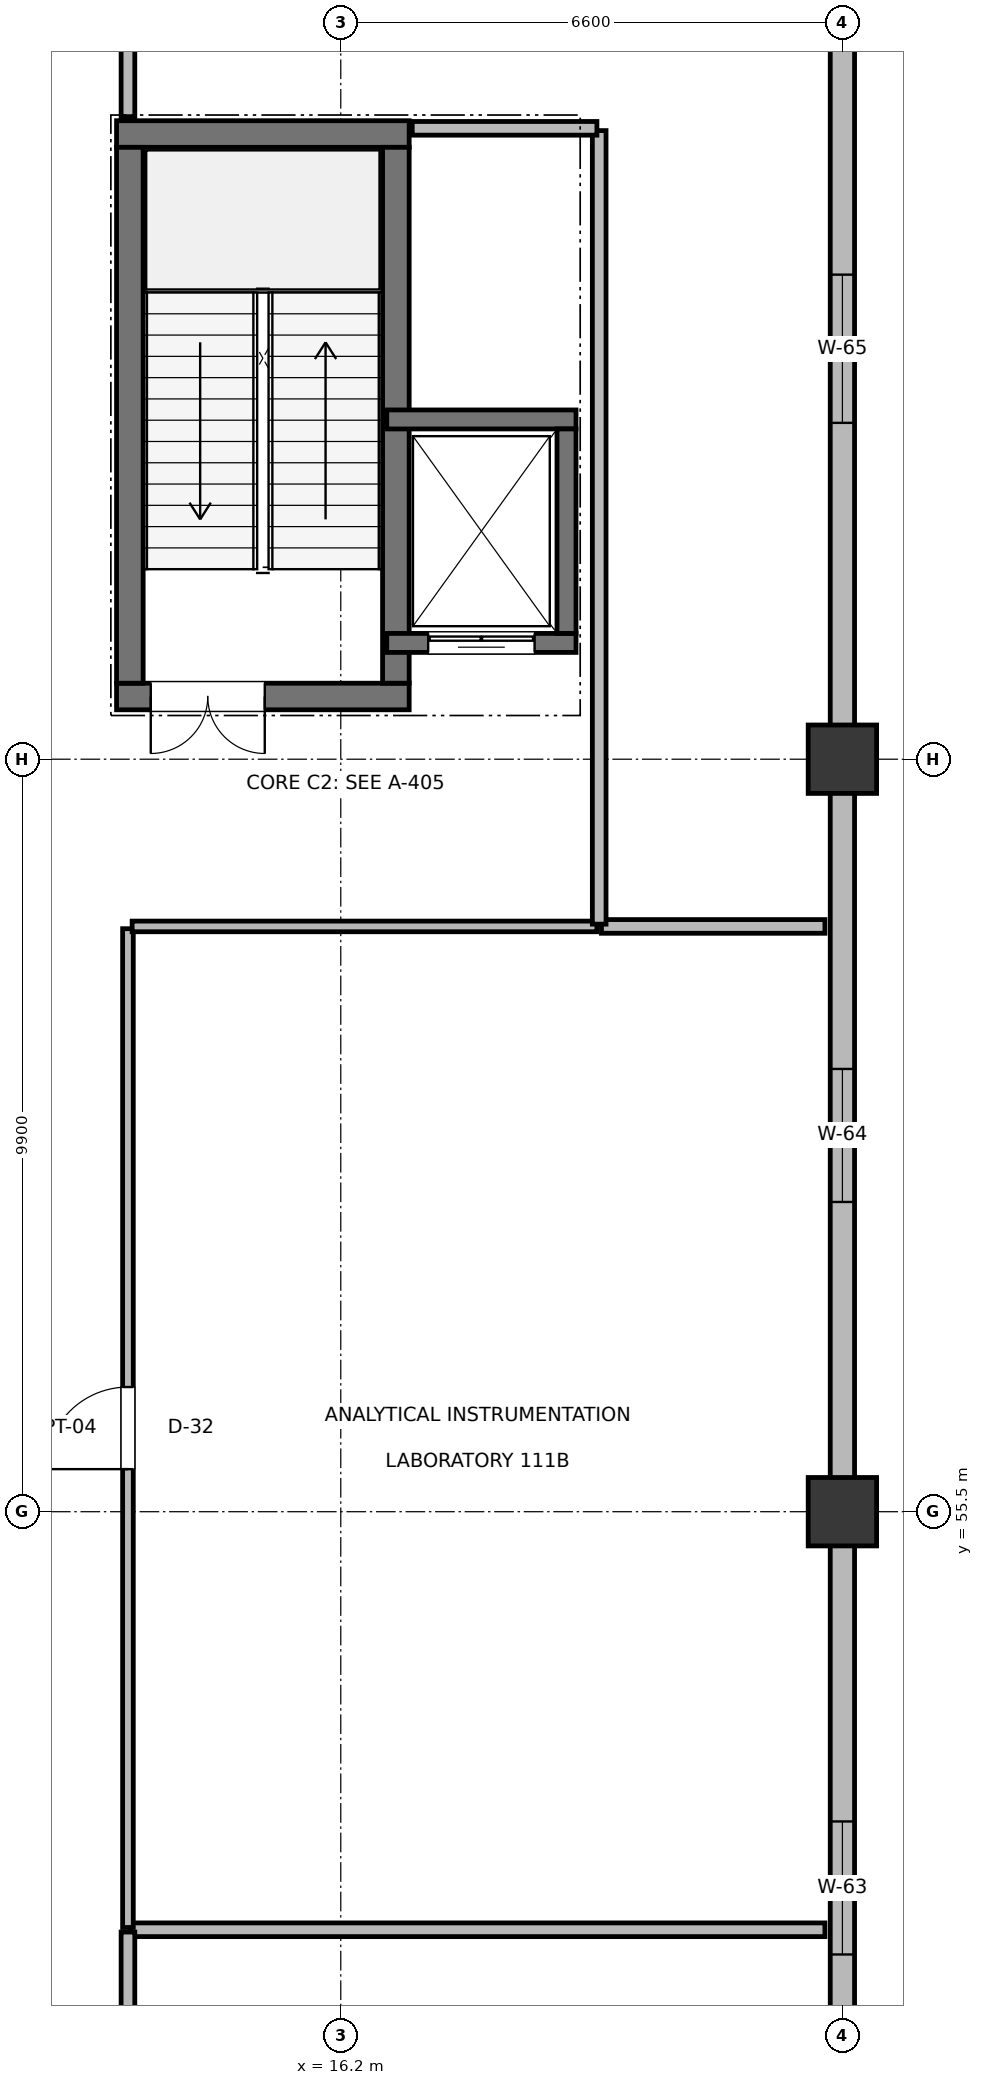
"""IFC4 building model, lengths in metres.
Left out: names, types, materials, properties, quantities, classifications, styles, units other than length and angle.
Written with IfcOpenShell. Run it as: python <this file> out.ifc"""

import sys

from ifc_helpers import new_model, si_unit, direction, frame, frame_2d, origin, origin_2d, place, context, subcontext, project, spatial, rectangle, extrude, element, fill, save


model = new_model("IFC4")
c1 = context("Model", 3, precision=1e-05, world=origin(), true_north=direction((0.0, 1.0)))
c2 = subcontext(c1, "Body", "Model", "MODEL_VIEW")
j1 = project(units=[si_unit("LENGTHUNIT", "METRE"), si_unit("PLANEANGLEUNIT", "RADIAN")], contexts=[c1])
p1 = place(None, origin())
s1 = spatial("IfcSite", under=j1, at=p1, CompositionType="ELEMENT")
p2 = place(p1, origin())
s2 = spatial("IfcBuilding", under=s1, at=p2, CompositionType="ELEMENT")
p3 = place(p2, frame((0.0, 0.0, 5.4)))
s3 = spatial("IfcBuildingStorey", under=s2, at=p3, CompositionType="ELEMENT", Elevation=5.4)
for number, where, z_axis, x_axis in (
    (1, (22.8, 55.5, 0.0), (0.0, 0.0, 1.0), (1.0, 0.0, 0.0)),
    (2, (22.8, 65.4, 0.0), (0.0, 0.0, 1.0), (1.0, 0.0, 0.0)),
):
    element("IfcColumn", number, at=place(p3, frame(where, z_axis=z_axis, x_axis=x_axis)), inside=s3, PredefinedType="COLUMN", context=c2, shape_type="SweptSolid", body=[
        extrude(rectangle(XDim=0.9, YDim=0.9, at=origin_2d()), origin(), (0.0, 0.0, 1.0), 4.8),
    ])
p4 = place(p3, frame((22.8, 46.035, 0.0), z_axis=(0.0, 0.0, 1.0), x_axis=(0.0, 1.0, 0.0)))
e3 = element("IfcWall", 3, at=p4, inside=s3, PredefinedType="SOLIDWALL", context=c2, shape_type="SweptSolid", body=[
    extrude(rectangle(XDim=9.03, YDim=0.32, at=frame_2d((4.515, 0.0))), origin(), (0.0, 0.0, 1.0), 3.625),
])
p5 = place(p4, frame((3.64, 0.0, 0.9)))
e4 = element("IfcOpeningElement", 4, at=p5, cuts=e3, PredefinedType="OPENING", context=c2, shape_type="SweptSolid", body=[
    extrude(rectangle(XDim=1.75, YDim=1.55, at=frame_2d((0.875, 0.775))), frame((0.0, 0.17, 0.0), z_axis=(0.0, -1.0, 0.0), x_axis=(1.0, 0.0, 0.0)), (0.0, 0.0, 1.0), 0.34),
])
p6 = place(p3, frame((22.8, 55.935, 0.0), z_axis=(0.0, 0.0, 1.0), x_axis=(0.0, 1.0, 0.0)))
e5 = element("IfcWall", 5, at=p6, inside=s3, PredefinedType="SOLIDWALL", context=c2, shape_type="SweptSolid", body=[
    extrude(rectangle(XDim=9.03, YDim=0.32, at=frame_2d((4.515, 0.0))), origin(), (0.0, 0.0, 1.0), 3.625),
])
p7 = place(p6, frame((3.64, 0.0, 0.9)))
e6 = element("IfcOpeningElement", 6, at=p7, cuts=e5, PredefinedType="OPENING", context=c2, shape_type="SweptSolid", body=[
    extrude(rectangle(XDim=1.75, YDim=1.75, at=frame_2d((0.875, 0.875))), frame((0.0, 0.17, 0.0), z_axis=(0.0, -1.0, 0.0), x_axis=(1.0, 0.0, 0.0)), (0.0, 0.0, 1.0), 0.34),
])
p8 = place(p3, frame((22.8, 65.835, 0.0), z_axis=(0.0, 0.0, 1.0), x_axis=(0.0, 1.0, 0.0)))
e7 = element("IfcWall", 7, at=p8, inside=s3, PredefinedType="SOLIDWALL", context=c2, shape_type="SweptSolid", body=[
    extrude(rectangle(XDim=9.93, YDim=0.32, at=frame_2d((4.965, 0.0))), origin(), (0.0, 0.0, 1.0), 3.625),
])
p9 = place(p8, frame((3.99, 0.0, 0.9)))
e8 = element("IfcOpeningElement", 8, at=p9, cuts=e7, PredefinedType="OPENING", context=c2, shape_type="SweptSolid", body=[
    extrude(rectangle(XDim=1.95, YDim=1.15, at=frame_2d((0.975, 0.575))), frame((0.0, 0.17, 0.0), z_axis=(0.0, -1.0, 0.0), x_axis=(1.0, 0.0, 0.0)), (0.0, 0.0, 1.0), 0.34),
])
p10 = place(p3, frame((13.25, 66.225, 0.0), z_axis=(0.0, 0.0, 1.0), x_axis=(1.0, 0.0, 0.0)))
e9 = element("IfcWall", 9, at=p10, inside=s3, PredefinedType="SHEAR", context=c2, shape_type="SweptSolid", body=[
    extrude(rectangle(XDim=3.85, YDim=0.35, at=frame_2d((1.925, 0.0))), origin(), (0.0, 0.0, 1.0), 4.58),
])
p11 = place(p10, frame((0.45, 0.0, 0.0)))
e10 = element("IfcOpeningElement", 10, at=p11, cuts=e9, PredefinedType="OPENING", context=c2, shape_type="SweptSolid", body=[
    extrude(rectangle(XDim=1.5, YDim=2.2, at=frame_2d((0.75, 1.1))), frame((0.0, 0.185, 0.0), z_axis=(0.0, -1.0, 0.0), x_axis=(1.0, 0.0, 0.0)), (0.0, 0.0, 1.0), 0.37),
])
p12 = place(p3, frame((13.25, 73.625, 0.0), z_axis=(0.0, 0.0, 1.0), x_axis=(1.0, 0.0, 0.0)))
e11 = element("IfcWall", 11, at=p12, inside=s3, PredefinedType="SHEAR", context=c2, shape_type="SweptSolid", body=[
    extrude(rectangle(XDim=3.85, YDim=0.35, at=frame_2d((1.925, 0.0))), origin(), (0.0, 0.0, 1.0), 4.58),
])
for number, where, z_axis, x_axis in (
    (12, (13.425, 66.4, 0.0), (0.0, 0.0, 1.0), (0.0, 1.0, 0.0)),
    (13, (16.925, 66.4, 0.0), (0.0, 0.0, 1.0), (0.0, 1.0, 0.0)),
):
    element("IfcWall", number, at=place(p3, frame(where, z_axis=z_axis, x_axis=x_axis)), inside=s3, PredefinedType="SHEAR", context=c2, shape_type="SweptSolid", body=[
        extrude(rectangle(XDim=7.05, YDim=0.35, at=frame_2d((3.525, 0.0))), origin(), (0.0, 0.0, 1.0), 4.58),
    ])
p13 = place(p3, frame((16.805, 66.93, 0.0), z_axis=(0.0, 0.0, 1.0), x_axis=(1.0, 0.0, 0.0)))
e14 = element("IfcWall", 14, at=p13, inside=s3, PredefinedType="SHEAR", context=c2, shape_type="SweptSolid", body=[
    extrude(rectangle(XDim=2.49, YDim=0.25, at=frame_2d((1.245, 0.0))), origin(), (0.0, 0.0, 1.0), 4.56),
])
p14 = place(p13, frame((0.545, 0.0, 0.0)))
e15 = element("IfcOpeningElement", 15, at=p14, cuts=e14, PredefinedType="OPENING", context=c2, shape_type="SweptSolid", body=[
    extrude(rectangle(XDim=1.4, YDim=2.3, at=frame_2d((0.7, 1.15))), frame((0.0, 0.135, 0.0), z_axis=(0.0, -1.0, 0.0), x_axis=(1.0, 0.0, 0.0)), (0.0, 0.0, 1.0), 0.27),
])
p15 = place(p3, frame((16.805, 69.87, 0.0), z_axis=(0.0, 0.0, 1.0), x_axis=(1.0, 0.0, 0.0)))
e16 = element("IfcWall", 16, at=p15, inside=s3, PredefinedType="SHEAR", context=c2, shape_type="SweptSolid", body=[
    extrude(rectangle(XDim=2.49, YDim=0.25, at=frame_2d((1.245, 0.0))), origin(), (0.0, 0.0, 1.0), 4.56),
])
p16 = place(p3, frame((19.17, 67.055, 0.0), z_axis=(0.0, 0.0, 1.0), x_axis=(0.0, 1.0, 0.0)))
e17 = element("IfcWall", 17, at=p16, inside=s3, PredefinedType="SHEAR", context=c2, shape_type="SweptSolid", body=[
    extrude(rectangle(XDim=2.69, YDim=0.25, at=frame_2d((1.345, 0.0))), origin(), (0.0, 0.0, 1.0), 4.56),
])
p17 = place(p3, frame((13.43, 50.0, 0.0), z_axis=(0.0, 0.0, 1.0), x_axis=(1.0, 0.0, 0.0)))
e18 = element("IfcWall", 18, at=p17, inside=s3, PredefinedType="PARTITIONING", context=c2, shape_type="SweptSolid", body=[
    extrude(rectangle(XDim=9.14, YDim=0.18, at=frame_2d((4.57, 0.0))), origin(), (0.0, 0.0, 1.0), 3.625),
])
p18 = place(p3, frame((13.4, 30.03, 0.0), z_axis=(0.0, 0.0, 1.0), x_axis=(0.0, 1.0, 0.0)))
e19 = element("IfcWall", 19, at=p18, inside=s3, PredefinedType="PARTITIONING", context=c2, shape_type="SweptSolid", body=[
    extrude(rectangle(XDim=19.94, YDim=0.18, at=frame_2d((9.97, 0.0))), origin(), (0.0, 0.0, 1.0), 3.555),
])
p19 = place(p18, frame((9.445, 0.0, 0.0)))
e20 = element("IfcOpeningElement", 20, at=p19, cuts=e19, PredefinedType="OPENING", context=c2, shape_type="SweptSolid", body=[
    extrude(rectangle(XDim=1.05, YDim=2.2, at=frame_2d((0.525, 1.1))), frame((0.0, 0.1, 0.0), z_axis=(0.0, -1.0, 0.0), x_axis=(1.0, 0.0, 0.0)), (0.0, 0.0, 1.0), 0.2),
])
p20 = place(p3, frame((19.63, 63.2, 0.0), z_axis=(0.0, 0.0, 1.0), x_axis=(1.0, 0.0, 0.0)))
e21 = element("IfcWall", 21, at=p20, inside=s3, PredefinedType="PARTITIONING", context=c2, shape_type="SweptSolid", body=[
    extrude(rectangle(XDim=2.94, YDim=0.18, at=frame_2d((1.47, 0.0))), origin(), (0.0, 0.0, 1.0), 3.625),
])
p21 = place(p3, frame((13.4, 50.03, 0.0), z_axis=(0.0, 0.0, 1.0), x_axis=(0.0, 1.0, 0.0)))
e22 = element("IfcWall", 22, at=p21, inside=s3, PredefinedType="PARTITIONING", context=c2, shape_type="SweptSolid", body=[
    extrude(rectangle(XDim=13.14, YDim=0.14, at=frame_2d((6.57, 0.0))), origin(), (0.0, 0.0, 1.0), 3.675),
])
p22 = place(p21, frame((6.03, 0.0, 0.0)))
e23 = element("IfcOpeningElement", 23, at=p22, cuts=e22, PredefinedType="OPENING", context=c2, shape_type="SweptSolid", body=[
    extrude(rectangle(XDim=1.08, YDim=2.15, at=frame_2d((0.54, 1.075))), frame((0.0, 0.08, 0.0), z_axis=(0.0, -1.0, 0.0), x_axis=(1.0, 0.0, 0.0)), (0.0, 0.0, 1.0), 0.16),
])
p23 = place(p3, frame((13.455, 63.2, 0.0), z_axis=(0.0, 0.0, 1.0), x_axis=(1.0, 0.0, 0.0)))
e24 = element("IfcWall", 24, at=p23, inside=s3, PredefinedType="PARTITIONING", context=c2, shape_type="SweptSolid", body=[
    extrude(rectangle(XDim=6.115, YDim=0.14, at=frame_2d((3.058, 0.0))), origin(), (0.0, 0.0, 1.0), 3.875),
])
p24 = place(p3, frame((13.4, 73.853, 0.0), z_axis=(0.0, 0.0, 1.0), x_axis=(0.0, 1.0, 0.0)))
e25 = element("IfcWall", 25, at=p24, inside=s3, PredefinedType="PARTITIONING", context=c2, shape_type="SweptSolid", body=[
    extrude(rectangle(XDim=11.117, YDim=0.18, at=frame_2d((5.558, 0.0))), origin(), (0.0, 0.0, 1.0), 3.675),
])
p25 = place(p24, frame((4.858, 0.0, 0.0)))
e26 = element("IfcOpeningElement", 26, at=p25, cuts=e25, PredefinedType="OPENING", context=c2, shape_type="SweptSolid", body=[
    extrude(rectangle(XDim=1.4, YDim=2.2, at=frame_2d((0.7, 1.1))), frame((0.0, 0.1, 0.0), z_axis=(0.0, -1.0, 0.0), x_axis=(1.0, 0.0, 0.0)), (0.0, 0.0, 1.0), 0.2),
])
p26 = place(p3, frame((19.6, 63.23, 0.0), z_axis=(0.0, 0.0, 1.0), x_axis=(0.0, 1.0, 0.0)))
e27 = element("IfcWall", 27, at=p26, inside=s3, PredefinedType="PARTITIONING", context=c2, shape_type="SweptSolid", body=[
    extrude(rectangle(XDim=10.44, YDim=0.18, at=frame_2d((5.22, 0.0))), origin(), (0.0, 0.0, 1.0), 3.655),
])
p27 = place(p3, frame((17.14, 73.7, 0.0), z_axis=(0.0, 0.0, 1.0), x_axis=(1.0, 0.0, 0.0)))
e28 = element("IfcWall", 28, at=p27, inside=s3, PredefinedType="PARTITIONING", context=c2, shape_type="SweptSolid", body=[
    extrude(rectangle(XDim=2.43, YDim=0.18, at=frame_2d((1.215, 0.0))), origin(), (0.0, 0.0, 1.0), 4.48),
])
p28 = place(p5, frame((1.75, 0.0, 0.0), z_axis=(0.0, 0.0, 1.0), x_axis=(-1.0, 0.0, 0.0)))
e29 = element("IfcWindow", 29, at=p28, inside=s3, PartitioningType="DOUBLE_PANEL_VERTICAL", PredefinedType="WINDOW", context=c2, shape_type="SweptSolid", body=[
    extrude(rectangle(XDim=1.75, YDim=1.55, at=frame_2d((0.875, 0.775))), frame((0.0, 0.03, 0.0), z_axis=(0.0, -1.0, 0.0), x_axis=(1.0, 0.0, 0.0)), (0.0, 0.0, 1.0), 0.06),
])
fill(e4, e29)
p29 = place(p7, frame((1.75, 0.0, 0.0), z_axis=(0.0, 0.0, 1.0), x_axis=(-1.0, 0.0, 0.0)))
e30 = element("IfcWindow", 30, at=p29, inside=s3, PartitioningType="DOUBLE_PANEL_VERTICAL", PredefinedType="WINDOW", context=c2, shape_type="SweptSolid", body=[
    extrude(rectangle(XDim=1.75, YDim=1.75, at=frame_2d((0.875, 0.875))), frame((0.0, 0.03, 0.0), z_axis=(0.0, -1.0, 0.0), x_axis=(1.0, 0.0, 0.0)), (0.0, 0.0, 1.0), 0.06),
])
fill(e6, e30)
p30 = place(p9, frame((1.95, 0.0, 0.0), z_axis=(0.0, 0.0, 1.0), x_axis=(-1.0, 0.0, 0.0)))
e31 = element("IfcWindow", 31, at=p30, inside=s3, PartitioningType="DOUBLE_PANEL_VERTICAL", PredefinedType="WINDOW", context=c2, shape_type="SweptSolid", body=[
    extrude(rectangle(XDim=1.95, YDim=1.15, at=frame_2d((0.975, 0.575))), frame((0.0, 0.03, 0.0), z_axis=(0.0, -1.0, 0.0), x_axis=(1.0, 0.0, 0.0)), (0.0, 0.0, 1.0), 0.06),
])
fill(e8, e31)
p31 = place(p11, frame((1.5, 0.0, 0.0), z_axis=(0.0, 0.0, 1.0), x_axis=(-1.0, 0.0, 0.0)))
e32 = element("IfcDoor", 32, at=p31, inside=s3, OperationType="DOUBLE_DOOR_SINGLE_SWING", PredefinedType="DOOR", context=c2, shape_type="SweptSolid", body=[
    extrude(rectangle(XDim=1.5, YDim=2.2, at=frame_2d((0.75, 1.1))), frame((0.0, 0.025, 0.0), z_axis=(0.0, -1.0, 0.0), x_axis=(1.0, 0.0, 0.0)), (0.0, 0.0, 1.0), 0.05),
])
fill(e10, e32)
p32 = place(p14, frame((1.4, 0.0, 0.0), z_axis=(0.0, 0.0, 1.0), x_axis=(-1.0, 0.0, 0.0)))
e33 = element("IfcDoor", 33, at=p32, inside=s3, OperationType="DOUBLE_DOOR_SLIDING", PredefinedType="DOOR", context=c2, shape_type="SweptSolid", body=[
    extrude(rectangle(XDim=1.4, YDim=2.3, at=frame_2d((0.7, 1.15))), frame((0.0, 0.025, 0.0), z_axis=(0.0, -1.0, 0.0), x_axis=(1.0, 0.0, 0.0)), (0.0, 0.0, 1.0), 0.05),
])
fill(e15, e33)
p33 = place(p22, origin())
e34 = element("IfcDoor", 34, at=p33, inside=s3, OperationType="SINGLE_SWING_LEFT", PredefinedType="DOOR", context=c2, shape_type="SweptSolid", body=[
    extrude(rectangle(XDim=1.08, YDim=2.15, at=frame_2d((0.54, 1.075))), frame((0.0, 0.025, 0.0), z_axis=(0.0, -1.0, 0.0), x_axis=(1.0, 0.0, 0.0)), (0.0, 0.0, 1.0), 0.05),
])
fill(e23, e34)
save(model, sys.argv[1])
